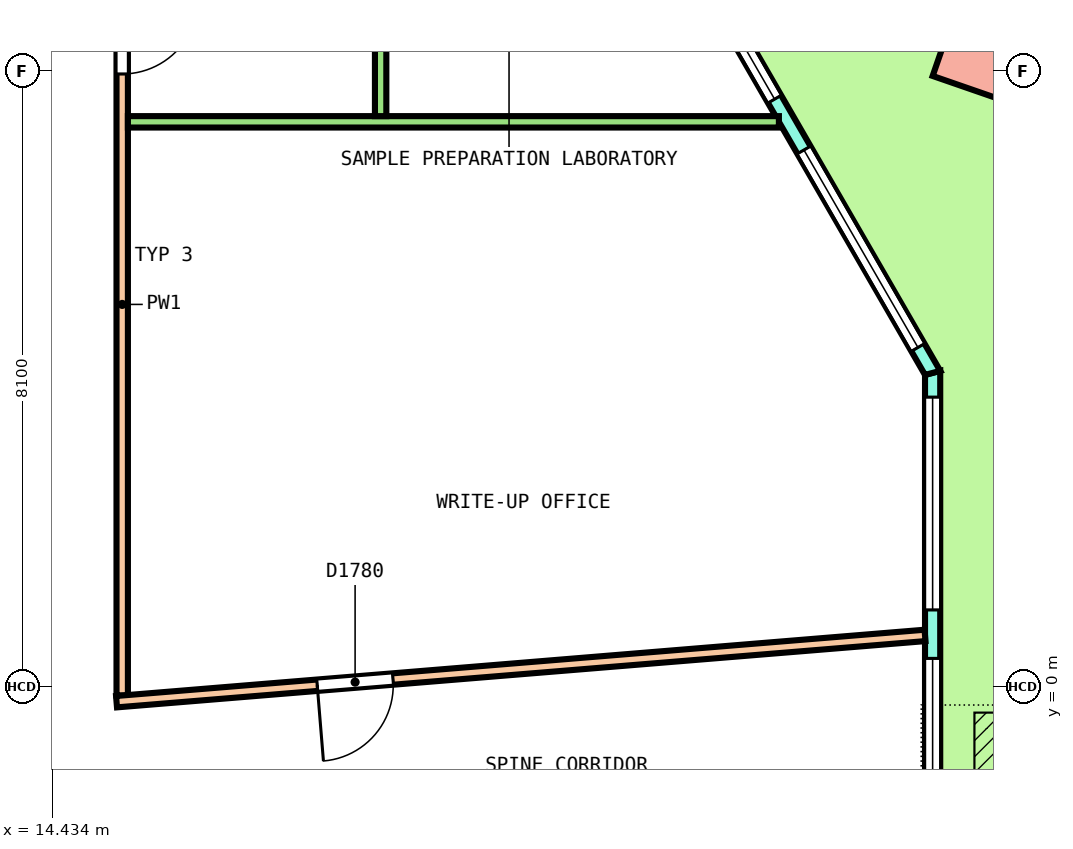
"""IFC4 building model, lengths in metres.
Left out: names, types, materials, properties, quantities, classifications, styles, units other than length and angle.
Written with IfcOpenShell. Run it as: python <this file> out.ifc"""

import sys

from ifc_helpers import new_model, si_unit, direction, frame, frame_2d, origin, origin_2d, place, context, subcontext, project, spatial, polyline, rectangle, outline, extrude, element, fill, save


model = new_model("IFC4")
c1 = context("Model", 3, precision=1e-05, world=origin(), true_north=direction((0.0, 1.0)))
c2 = subcontext(c1, "Body", "Model", "MODEL_VIEW")
j1 = project(units=[si_unit("LENGTHUNIT", "METRE"), si_unit("PLANEANGLEUNIT", "RADIAN")], contexts=[c1])
p1 = place(None, origin())
s1 = spatial("IfcSite", under=j1, at=p1, CompositionType="ELEMENT")
p2 = place(p1, origin())
s2 = spatial("IfcBuilding", under=s1, at=p2, CompositionType="ELEMENT")
p3 = place(p2, frame((0.0, 0.0, 167.2)))
s3 = spatial("IfcBuildingStorey", under=s2, at=p3, CompositionType="ELEMENT", Elevation=167.2)
p4 = place(p3, frame((26.776, 8.406, 0.0), z_axis=(0.021749357258, 0.025183466299, 0.999446225909), x_axis=(-0.501141721156, 0.865296605573, -0.010897692434)))
e1 = element("IfcColumn", 1, at=p4, inside=s3, PredefinedType="COLUMN", context=c2, shape_type="SweptSolid", body=[
    extrude(rectangle(XDim=1.2, YDim=1.2, at=origin_2d()), origin(), (0.0, 0.0, 1.0), 4.052),
])
p5 = place(p3, frame((26.012, -2.746, 0.0), z_axis=(0.0, 0.0, 1.0), x_axis=(0.0, 1.0, 0.0)))
e2 = element("IfcWall", 2, at=p5, inside=s3, PredefinedType="SOLIDWALL", context=c2, shape_type="SweptSolid", body=[
    extrude(outline(polyline([(-0.027, -0.1), (1.128, -0.1), (2.282, -0.1), (3.437, -0.1), (4.592, -0.1), (5.747, -0.1), (6.901, -0.1), (6.848, 0.1), (5.711, 0.1), (4.574, 0.1), (3.437, 0.1), (2.301, 0.1), (1.164, 0.1), (0.027, 0.1), (-0.027, -0.1)])), origin(), (0.0, 0.0, 1.0), 4.1),
])
p6 = place(p5, frame((0.319, 0.0, 0.1)))
e3 = element("IfcOpeningElement", 3, at=p6, cuts=e2, PredefinedType="OPENING", context=c2, shape_type="SweptSolid", body=[
    extrude(rectangle(XDim=2.8, YDim=2.9, at=frame_2d((1.4, 1.45))), frame((0.0, 0.11, 0.0), z_axis=(0.0, -1.0, 0.0), x_axis=(1.0, 0.0, 0.0)), (0.0, 0.0, 1.0), 0.22),
])
p7 = place(p5, frame((3.756, 0.0, 0.1)))
e4 = element("IfcOpeningElement", 4, at=p7, cuts=e2, PredefinedType="OPENING", context=c2, shape_type="SweptSolid", body=[
    extrude(rectangle(XDim=2.8, YDim=2.9, at=frame_2d((1.4, 1.45))), frame((0.0, 0.11, 0.0), z_axis=(0.0, -1.0, 0.0), x_axis=(1.0, 0.0, 0.0)), (0.0, 0.0, 1.0), 0.22),
])
p8 = place(p3, frame((26.012, 4.129, 0.0), z_axis=(0.0, 0.0, 1.0), x_axis=(-0.499999588275, 0.866025641494, 0.0)))
e5 = element("IfcWall", 5, at=p8, inside=s3, PredefinedType="SOLIDWALL", context=c2, shape_type="SweptSolid", body=[
    extrude(outline(polyline([(-0.027, -0.1), (1.024, -0.1), (2.075, -0.1), (3.125, -0.1), (4.176, -0.1), (5.227, -0.1), (6.278, -0.1), (7.329, -0.1), (8.38, -0.1), (9.43, -0.1), (10.481, -0.1), (11.532, -0.1), (12.583, -0.1), (13.634, -0.1), (14.685, -0.1), (15.735, -0.1), (16.786, -0.1), (17.837, -0.1), (18.888, -0.1), (18.834, 0.1), (17.789, 0.1), (16.744, 0.1), (15.699, 0.1), (14.655, 0.1), (13.61, 0.1), (12.565, 0.1), (11.52, 0.1), (10.475, 0.1), (9.43, 0.1), (8.385, 0.1), (7.341, 0.1), (6.296, 0.1), (5.251, 0.1), (4.206, 0.1), (3.161, 0.1), (2.116, 0.1), (1.072, 0.1), (0.027, 0.1), (-0.027, -0.1)])), origin(), (0.0, 0.0, 1.0), 4.1),
])
p9 = place(p8, frame((0.386, 0.0, 0.1)))
e6 = element("IfcOpeningElement", 6, at=p9, cuts=e5, PredefinedType="OPENING", context=c2, shape_type="SweptSolid", body=[
    extrude(rectangle(XDim=3.0, YDim=2.9, at=frame_2d((1.5, 1.45))), frame((0.0, 0.11, 0.0), z_axis=(0.0, -1.0, 0.0), x_axis=(1.0, 0.0, 0.0)), (0.0, 0.0, 1.0), 0.22),
])
p10 = place(p8, frame((4.158, 0.0, 0.1)))
e7 = element("IfcOpeningElement", 7, at=p10, cuts=e5, PredefinedType="OPENING", context=c2, shape_type="SweptSolid", body=[
    extrude(rectangle(XDim=3.0, YDim=2.9, at=frame_2d((1.5, 1.45))), frame((0.0, 0.11, 0.0), z_axis=(0.0, -1.0, 0.0), x_axis=(1.0, 0.0, 0.0)), (0.0, 0.0, 1.0), 0.22),
])
p11 = place(p8, frame((8.531, 0.0, 0.0)))
e8 = element("IfcOpeningElement", 8, at=p11, cuts=e5, PredefinedType="OPENING", context=c2, shape_type="SweptSolid", body=[
    extrude(rectangle(XDim=1.8, YDim=2.4, at=frame_2d((0.9, 1.2))), frame((0.0, 0.11, 0.0), z_axis=(0.0, -1.0, 0.0), x_axis=(1.0, 0.0, 0.0)), (0.0, 0.0, 1.0), 0.22),
])
p12 = place(p8, frame((8.531, 0.0, 2.55)))
e9 = element("IfcOpeningElement", 9, at=p12, cuts=e5, PredefinedType="OPENING", context=c2, shape_type="SweptSolid", body=[
    extrude(rectangle(XDim=1.8, YDim=0.45, at=frame_2d((0.9, 0.225))), frame((0.0, 0.11, 0.0), z_axis=(0.0, -1.0, 0.0), x_axis=(1.0, 0.0, 0.0)), (0.0, 0.0, 1.0), 0.22),
])
p13 = place(p8, frame((11.703, 0.0, 0.1)))
e10 = element("IfcOpeningElement", 10, at=p13, cuts=e5, PredefinedType="OPENING", context=c2, shape_type="SweptSolid", body=[
    extrude(rectangle(XDim=3.0, YDim=2.9, at=frame_2d((1.5, 1.45))), frame((0.0, 0.11, 0.0), z_axis=(0.0, -1.0, 0.0), x_axis=(1.0, 0.0, 0.0)), (0.0, 0.0, 1.0), 0.22),
])
p14 = place(p8, frame((15.475, 0.0, 0.1)))
e11 = element("IfcOpeningElement", 11, at=p14, cuts=e5, PredefinedType="OPENING", context=c2, shape_type="SweptSolid", body=[
    extrude(rectangle(XDim=3.0, YDim=2.9, at=frame_2d((1.5, 1.45))), frame((0.0, 0.11, 0.0), z_axis=(0.0, -1.0, 0.0), x_axis=(1.0, 0.0, 0.0)), (0.0, 0.0, 1.0), 0.22),
])
p15 = place(p3, frame((15.35, -0.116, 0.0), z_axis=(0.0, 0.0, 1.0), x_axis=(0.0, 1.0, 0.0)))
e12 = element("IfcWall", 12, at=p15, inside=s3, PredefinedType="PARTITIONING", context=c2, shape_type="SweptSolid", body=[
    extrude(rectangle(XDim=10.291, YDim=0.15, at=frame_2d((5.146, 0.0))), origin(), (0.0, 0.0, 1.0), 3.05),
])
p16 = place(p15, frame((8.177, 0.0, 0.0)))
e13 = element("IfcOpeningElement", 13, at=p16, cuts=e12, PredefinedType="OPENING", context=c2, shape_type="SweptSolid", body=[
    extrude(rectangle(XDim=1.0, YDim=2.1, at=frame_2d((0.5, 1.05))), frame((0.0, 0.085, 0.0), z_axis=(0.0, -1.0, 0.0), x_axis=(1.0, 0.0, 0.0)), (0.0, 0.0, 1.0), 0.17),
])
p17 = place(p3, frame((15.275, -0.197, 0.0), z_axis=(0.0, 0.0, 1.0), x_axis=(0.996657796031, 0.081689886835, 0.0)))
e14 = element("IfcWall", 14, at=p17, inside=s3, PredefinedType="PARTITIONING", context=c2, shape_type="SweptSolid", body=[
    extrude(rectangle(XDim=10.672, YDim=0.15, at=frame_2d((5.336, 0.0))), origin(), (0.0, 0.0, 1.0), 3.05),
])
p18 = place(p17, frame((2.649, 0.0, 0.0)))
e15 = element("IfcOpeningElement", 15, at=p18, cuts=e14, PredefinedType="OPENING", context=c2, shape_type="SweptSolid", body=[
    extrude(rectangle(XDim=1.0, YDim=2.1, at=frame_2d((0.5, 1.05))), frame((0.0, 0.085, 0.0), z_axis=(0.0, -1.0, 0.0), x_axis=(1.0, 0.0, 0.0)), (0.0, 0.0, 1.0), 0.17),
])
p19 = place(p3, frame((15.425, 7.432, 0.0), z_axis=(0.0, 0.0, 1.0), x_axis=(1.0, 0.0, 0.0)))
e16 = element("IfcWall", 16, at=p19, inside=s3, PredefinedType="PARTITIONING", context=c2, shape_type="SweptSolid", body=[
    extrude(rectangle(XDim=8.564, YDim=0.15, at=frame_2d((4.282, 0.0))), origin(), (0.0, 0.0, 1.0), 3.05),
])
p20 = place(p3, frame((18.75, 7.507, 0.0), z_axis=(0.0, 0.0, 1.0), x_axis=(0.0, 1.0, 0.0)))
e17 = element("IfcWall", 17, at=p20, inside=s3, PredefinedType="PARTITIONING", context=c2, shape_type="SweptSolid", body=[
    extrude(rectangle(XDim=6.219, YDim=0.15, at=frame_2d((3.109, 0.0))), origin(), (0.0, 0.0, 1.0), 3.05),
])
p21 = place(p20, frame((1.405, 0.0, 0.0)))
e18 = element("IfcOpeningElement", 18, at=p21, cuts=e17, PredefinedType="OPENING", context=c2, shape_type="SweptSolid", body=[
    extrude(rectangle(XDim=1.0, YDim=2.1, at=frame_2d((0.5, 1.05))), frame((0.0, 0.085, 0.0), z_axis=(0.0, -1.0, 0.0), x_axis=(1.0, 0.0, 0.0)), (0.0, 0.0, 1.0), 0.17),
])
p22 = place(p6, origin())
e19 = element("IfcWindow", 19, at=p22, inside=s3, PartitioningType="SINGLE_PANEL", PredefinedType="WINDOW", context=c2, shape_type="SweptSolid", body=[
    extrude(rectangle(XDim=2.8, YDim=2.9, at=frame_2d((1.4, 1.45))), frame((0.0, 0.03, 0.0), z_axis=(0.0, -1.0, 0.0), x_axis=(1.0, 0.0, 0.0)), (0.0, 0.0, 1.0), 0.06),
])
fill(e3, e19)
p23 = place(p7, origin())
e20 = element("IfcWindow", 20, at=p23, inside=s3, PartitioningType="SINGLE_PANEL", PredefinedType="WINDOW", context=c2, shape_type="SweptSolid", body=[
    extrude(rectangle(XDim=2.8, YDim=2.9, at=frame_2d((1.4, 1.45))), frame((0.0, 0.03, 0.0), z_axis=(0.0, -1.0, 0.0), x_axis=(1.0, 0.0, 0.0)), (0.0, 0.0, 1.0), 0.06),
])
fill(e4, e20)
p24 = place(p9, origin())
e21 = element("IfcWindow", 21, at=p24, inside=s3, PartitioningType="SINGLE_PANEL", PredefinedType="WINDOW", context=c2, shape_type="SweptSolid", body=[
    extrude(rectangle(XDim=3.0, YDim=2.9, at=frame_2d((1.5, 1.45))), frame((0.0, 0.03, 0.0), z_axis=(0.0, -1.0, 0.0), x_axis=(1.0, 0.0, 0.0)), (0.0, 0.0, 1.0), 0.06),
])
fill(e6, e21)
p25 = place(p10, origin())
e22 = element("IfcWindow", 22, at=p25, inside=s3, PartitioningType="SINGLE_PANEL", PredefinedType="WINDOW", context=c2, shape_type="SweptSolid", body=[
    extrude(rectangle(XDim=3.0, YDim=2.9, at=frame_2d((1.5, 1.45))), frame((0.0, 0.03, 0.0), z_axis=(0.0, -1.0, 0.0), x_axis=(1.0, 0.0, 0.0)), (0.0, 0.0, 1.0), 0.06),
])
fill(e7, e22)
p26 = place(p18, origin())
e23 = element("IfcDoor", 23, at=p26, inside=s3, OperationType="SINGLE_SWING_LEFT", PredefinedType="DOOR", context=c2, shape_type="SweptSolid", body=[
    extrude(rectangle(XDim=1.0, YDim=2.1, at=frame_2d((0.5, 1.05))), frame((0.0, 0.025, 0.0), z_axis=(0.0, -1.0, 0.0), x_axis=(1.0, 0.0, 0.0)), (0.0, 0.0, 1.0), 0.05),
])
fill(e15, e23)
p27 = place(p16, origin())
e24 = element("IfcDoor", 24, at=p27, inside=s3, OperationType="SINGLE_SWING_LEFT", PredefinedType="DOOR", context=c2, shape_type="SweptSolid", body=[
    extrude(rectangle(XDim=1.0, YDim=2.1, at=frame_2d((0.5, 1.05))), frame((0.0, 0.025, 0.0), z_axis=(0.0, -1.0, 0.0), x_axis=(1.0, 0.0, 0.0)), (0.0, 0.0, 1.0), 0.05),
])
fill(e13, e24)
save(model, sys.argv[1])
